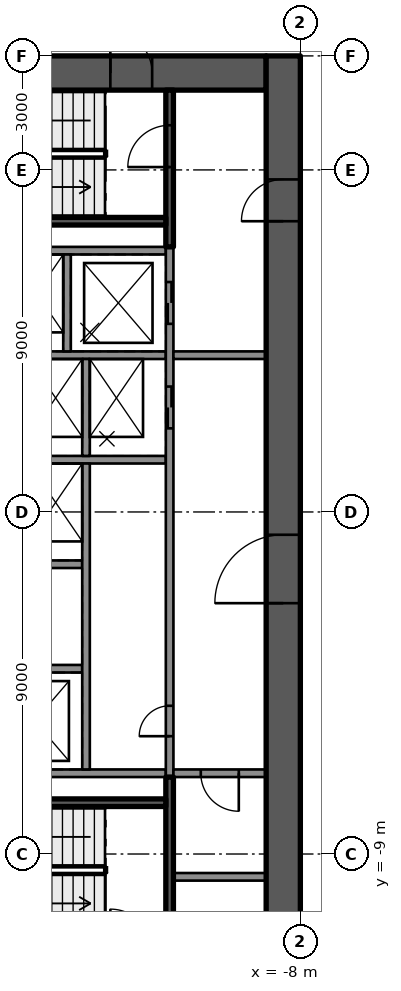
"""IFC4 building model, lengths in metres.
Left out: names, types, materials, properties, quantities, classifications, styles, units other than length and angle.
Written with IfcOpenShell. Run it as: python <this file> out.ifc"""

import sys

from ifc_helpers import new_model, si_unit, direction, frame, frame_2d, origin, place, context, subcontext, project, spatial, rectangle, extrude, element, fill, save


model = new_model("IFC4")
c1 = context("Model", 3, precision=1e-05, world=origin(), true_north=direction((0.0, 1.0)))
c2 = subcontext(c1, "Body", "Model", "MODEL_VIEW")
j1 = project(units=[si_unit("LENGTHUNIT", "METRE"), si_unit("PLANEANGLEUNIT", "RADIAN")], contexts=[c1])
p1 = place(None, origin())
s1 = spatial("IfcSite", under=j1, at=p1, CompositionType="ELEMENT")
p2 = place(p1, origin())
s2 = spatial("IfcBuilding", under=s1, at=p2, CompositionType="ELEMENT")
p3 = place(p2, frame((0.0, 0.0, 152.6)))
s3 = spatial("IfcBuildingStorey", under=s2, at=p3, CompositionType="ELEMENT", Elevation=152.6)
p4 = place(p3, frame((-18.1, 11.55, 0.0), z_axis=(0.0, 0.0, 1.0), x_axis=(1.0, 0.0, 0.0)))
e1 = element("IfcWall", 1, at=p4, inside=s3, PredefinedType="SHEAR", context=c2, shape_type="SweptSolid", body=[
    extrude(rectangle(XDim=9.2, YDim=0.9, at=frame_2d((4.6, 0.0))), origin(), (0.0, 0.0, 1.0), 3.5),
])
p5 = place(p4, frame((5.1, 0.0, 0.0)))
e2 = element("IfcOpeningElement", 2, at=p5, cuts=e1, PredefinedType="OPENING", context=c2, shape_type="SweptSolid", body=[
    extrude(rectangle(XDim=1.1, YDim=2.1, at=frame_2d((0.55, 1.05))), frame((0.0, 0.46, 0.0), z_axis=(0.0, -1.0, 0.0), x_axis=(1.0, 0.0, 0.0)), (0.0, 0.0, 1.0), 0.92),
])
p6 = place(p3, frame((-8.45, -12.0, 0.0), z_axis=(0.0, 0.0, 1.0), x_axis=(0.0, 1.0, 0.0)))
e3 = element("IfcWall", 3, at=p6, inside=s3, PredefinedType="SHEAR", context=c2, shape_type="SweptSolid", body=[
    extrude(rectangle(XDim=24.0, YDim=0.9, at=frame_2d((12.0, 0.0))), origin(), (0.0, 0.0, 1.0), 3.5),
])
p7 = place(p6, frame((9.6, 0.0, 0.0)))
e4 = element("IfcOpeningElement", 4, at=p7, cuts=e3, PredefinedType="OPENING", context=c2, shape_type="SweptSolid", body=[
    extrude(rectangle(XDim=1.8, YDim=2.1, at=frame_2d((0.9, 1.05))), frame((0.0, 0.46, 0.0), z_axis=(0.0, -1.0, 0.0), x_axis=(1.0, 0.0, 0.0)), (0.0, 0.0, 1.0), 0.92),
])
p8 = place(p6, frame((19.65, 0.0, 0.0)))
e5 = element("IfcOpeningElement", 5, at=p8, cuts=e3, PredefinedType="OPENING", context=c2, shape_type="SweptSolid", body=[
    extrude(rectangle(XDim=1.1, YDim=2.1, at=frame_2d((0.55, 1.05))), frame((0.0, 0.46, 0.0), z_axis=(0.0, -1.0, 0.0), x_axis=(1.0, 0.0, 0.0)), (0.0, 0.0, 1.0), 0.92),
])
for number, where, z_axis, x_axis in (
    (6, (-11.54, 6.875, 0.0), (0.0, 0.0, 1.0), (-1.0, 0.0, 0.0)),
    (7, (-11.54, -6.875, 0.0), (0.0, 0.0, 1.0), (-1.0, 0.0, 0.0)),
):
    element("IfcWall", number, at=place(p3, frame(where, z_axis=z_axis, x_axis=x_axis)), inside=s3, PredefinedType="SOLIDWALL", context=c2, shape_type="SweptSolid", body=[
        extrude(rectangle(XDim=6.56, YDim=0.2, at=frame_2d((3.28, 0.0))), origin(), (0.0, 0.0, 1.0), 3.09),
    ])
p9 = place(p3, frame((-13.74, -4.125, 0.0), z_axis=(0.0, 0.0, 1.0), x_axis=(-1.0, 0.0, 0.0)))
e8 = element("IfcWall", 8, at=p9, inside=s3, PredefinedType="SOLIDWALL", context=c2, shape_type="SweptSolid", body=[
    extrude(rectangle(XDim=2.5, YDim=0.2, at=frame_2d((1.25, 0.0))), origin(), (0.0, 0.0, 1.0), 3.09),
])
p10 = place(p3, frame((-13.74, -1.375, 0.0), z_axis=(0.0, 0.0, 1.0), x_axis=(-1.0, 0.0, 0.0)))
e9 = element("IfcWall", 9, at=p10, inside=s3, PredefinedType="SOLIDWALL", context=c2, shape_type="SweptSolid", body=[
    extrude(rectangle(XDim=2.0, YDim=0.2, at=frame_2d((1.0, 0.0))), origin(), (0.0, 0.0, 1.0), 3.09),
])
p11 = place(p3, frame((-11.54, 1.375, 0.0), z_axis=(0.0, 0.0, 1.0), x_axis=(-1.0, 0.0, 0.0)))
e10 = element("IfcWall", 10, at=p11, inside=s3, PredefinedType="SOLIDWALL", context=c2, shape_type="SweptSolid", body=[
    extrude(rectangle(XDim=4.2, YDim=0.2, at=frame_2d((2.1, 0.0))), origin(), (0.0, 0.0, 1.0), 3.09),
])
p12 = place(p3, frame((-11.54, 4.125, 0.0), z_axis=(0.0, 0.0, 1.0), x_axis=(-1.0, 0.0, 0.0)))
e11 = element("IfcWall", 11, at=p12, inside=s3, PredefinedType="SOLIDWALL", context=c2, shape_type="SweptSolid", body=[
    extrude(rectangle(XDim=4.7, YDim=0.2, at=frame_2d((2.35, 0.0))), origin(), (0.0, 0.0, 1.0), 3.09),
])
p13 = place(p3, frame((-11.44, -6.975, 0.0), z_axis=(0.0, 0.0, 1.0), x_axis=(0.0, 1.0, 0.0)))
e12 = element("IfcWall", 12, at=p13, inside=s3, PredefinedType="SOLIDWALL", context=c2, shape_type="SweptSolid", body=[
    extrude(rectangle(XDim=13.95, YDim=0.2, at=frame_2d((6.975, 0.0))), origin(), (0.0, 0.0, 1.0), 3.09),
])
p14 = place(p13, frame((9.175, 0.0, 0.0)))
e13 = element("IfcOpeningElement", 13, at=p14, cuts=e12, PredefinedType="OPENING", context=c2, shape_type="SweptSolid", body=[
    extrude(rectangle(XDim=1.1, YDim=2.1, at=frame_2d((0.55, 1.05))), frame((0.0, 0.11, 0.0), z_axis=(0.0, -1.0, 0.0), x_axis=(1.0, 0.0, 0.0)), (0.0, 0.0, 1.0), 0.22),
])
p15 = place(p13, frame((11.925, 0.0, 0.0)))
e14 = element("IfcOpeningElement", 14, at=p15, cuts=e12, PredefinedType="OPENING", context=c2, shape_type="SweptSolid", body=[
    extrude(rectangle(XDim=1.1, YDim=2.1, at=frame_2d((0.55, 1.05))), frame((0.0, 0.11, 0.0), z_axis=(0.0, -1.0, 0.0), x_axis=(1.0, 0.0, 0.0)), (0.0, 0.0, 1.0), 0.22),
])
p16 = place(p13, frame((1.075, 0.0, 0.0)))
e15 = element("IfcOpeningElement", 15, at=p16, cuts=e12, PredefinedType="OPENING", context=c2, shape_type="SweptSolid", body=[
    extrude(rectangle(XDim=0.8, YDim=2.1, at=frame_2d((0.4, 1.05))), frame((0.0, 0.11, 0.0), z_axis=(0.0, -1.0, 0.0), x_axis=(1.0, 0.0, 0.0)), (0.0, 0.0, 1.0), 0.22),
])
p17 = place(p3, frame((-13.64, -6.775, 0.0), z_axis=(0.0, 0.0, 1.0), x_axis=(0.0, 1.0, 0.0)))
e16 = element("IfcWall", 16, at=p17, inside=s3, PredefinedType="SOLIDWALL", context=c2, shape_type="SweptSolid", body=[
    extrude(rectangle(XDim=8.05, YDim=0.2, at=frame_2d((4.025, 0.0))), origin(), (0.0, 0.0, 1.0), 3.09),
])
for number, where, z_axis, x_axis in (
    (17, (-13.64, 1.475, 0.0), (0.0, 0.0, 1.0), (0.0, 1.0, 0.0)),
    (18, (-14.14, 4.225, 0.0), (0.0, 0.0, 1.0), (0.0, 1.0, 0.0)),
):
    element("IfcWall", number, at=place(p3, frame(where, z_axis=z_axis, x_axis=x_axis)), inside=s3, PredefinedType="SOLIDWALL", context=c2, shape_type="SweptSolid", body=[
        extrude(rectangle(XDim=2.55, YDim=0.2, at=frame_2d((1.275, 0.0))), origin(), (0.0, 0.0, 1.0), 3.09),
    ])
p18 = place(p3, frame((-11.44, 6.975, 0.0), z_axis=(0.0, 0.0, 1.0), x_axis=(0.0, 1.0, 0.0)))
e19 = element("IfcWall", 19, at=p18, inside=s3, PredefinedType="SOLIDWALL", context=c2, shape_type="SweptSolid", body=[
    extrude(rectangle(XDim=4.125, YDim=0.2, at=frame_2d((2.062, 0.0))), origin(), (0.0, 0.0, 1.0), 3.09),
])
p19 = place(p18, frame((2.1, 0.0, 0.0)))
e20 = element("IfcOpeningElement", 20, at=p19, cuts=e19, PredefinedType="OPENING", context=c2, shape_type="SweptSolid", body=[
    extrude(rectangle(XDim=1.1, YDim=2.1, at=frame_2d((0.55, 1.05))), frame((0.0, 0.11, 0.0), z_axis=(0.0, -1.0, 0.0), x_axis=(1.0, 0.0, 0.0)), (0.0, 0.0, 1.0), 0.22),
])
p20 = place(p3, frame((-11.54, 7.65, 0.0), z_axis=(0.0, 0.0, 1.0), x_axis=(-1.0, 0.0, 0.0)))
e21 = element("IfcWall", 21, at=p20, inside=s3, PredefinedType="SOLIDWALL", context=c2, shape_type="SweptSolid", body=[
    extrude(rectangle(XDim=6.56, YDim=0.2, at=frame_2d((3.28, 0.0))), origin(), (0.0, 0.0, 1.0), 3.09),
])
p21 = place(p3, frame((-11.44, -11.1, 0.0), z_axis=(0.0, 0.0, 1.0), x_axis=(0.0, 1.0, 0.0)))
e22 = element("IfcWall", 22, at=p21, inside=s3, PredefinedType="SOLIDWALL", context=c2, shape_type="SweptSolid", body=[
    extrude(rectangle(XDim=4.125, YDim=0.2, at=frame_2d((2.062, 0.0))), origin(), (0.0, 0.0, 1.0), 3.09),
])
p22 = place(p3, frame((-11.54, -7.65, 0.0), z_axis=(0.0, 0.0, 1.0), x_axis=(-1.0, 0.0, 0.0)))
e23 = element("IfcWall", 23, at=p22, inside=s3, PredefinedType="SOLIDWALL", context=c2, shape_type="SweptSolid", body=[
    extrude(rectangle(XDim=6.56, YDim=0.2, at=frame_2d((3.28, 0.0))), origin(), (0.0, 0.0, 1.0), 3.09),
])
p23 = place(p3, frame((-8.9, 4.125, 0.0), z_axis=(0.0, 0.0, 1.0), x_axis=(-1.0, 0.0, 0.0)))
e24 = element("IfcWall", 24, at=p23, inside=s3, PredefinedType="PARTITIONING", context=c2, shape_type="SweptSolid", body=[
    extrude(rectangle(XDim=2.44, YDim=0.2, at=frame_2d((1.22, 0.0))), origin(), (0.0, 0.0, 1.0), 3.09),
])
p24 = place(p3, frame((-8.9, -6.875, 0.0), z_axis=(0.0, 0.0, 1.0), x_axis=(-1.0, 0.0, 0.0)))
e25 = element("IfcWall", 25, at=p24, inside=s3, PredefinedType="PARTITIONING", context=c2, shape_type="SweptSolid", body=[
    extrude(rectangle(XDim=2.44, YDim=0.2, at=frame_2d((1.22, 0.0))), origin(), (0.0, 0.0, 1.0), 3.09),
])
p25 = place(p24, frame((0.72, 0.0, 0.0)))
e26 = element("IfcOpeningElement", 26, at=p25, cuts=e25, PredefinedType="OPENING", context=c2, shape_type="SweptSolid", body=[
    extrude(rectangle(XDim=1.0, YDim=2.1, at=frame_2d((0.5, 1.05))), frame((0.0, 0.11, 0.0), z_axis=(0.0, -1.0, 0.0), x_axis=(1.0, 0.0, 0.0)), (0.0, 0.0, 1.0), 0.22),
])
p26 = place(p3, frame((-8.9, -9.6, 0.0), z_axis=(0.0, 0.0, 1.0), x_axis=(-1.0, 0.0, 0.0)))
e27 = element("IfcWall", 27, at=p26, inside=s3, PredefinedType="PARTITIONING", context=c2, shape_type="SweptSolid", body=[
    extrude(rectangle(XDim=2.44, YDim=0.2, at=frame_2d((1.22, 0.0))), origin(), (0.0, 0.0, 1.0), 3.09),
])
p27 = place(p14, origin())
e28 = element("IfcDoor", 28, at=p27, inside=s3, OperationType="DOUBLE_DOOR_SLIDING", PredefinedType="DOOR", context=c2, shape_type="SweptSolid", body=[
    extrude(rectangle(XDim=1.1, YDim=2.1, at=frame_2d((0.55, 1.05))), frame((0.0, 0.025, 0.0), z_axis=(0.0, -1.0, 0.0), x_axis=(1.0, 0.0, 0.0)), (0.0, 0.0, 1.0), 0.05),
])
fill(e13, e28)
p28 = place(p15, origin())
e29 = element("IfcDoor", 29, at=p28, inside=s3, OperationType="DOUBLE_DOOR_SLIDING", PredefinedType="DOOR", context=c2, shape_type="SweptSolid", body=[
    extrude(rectangle(XDim=1.1, YDim=2.1, at=frame_2d((0.55, 1.05))), frame((0.0, 0.025, 0.0), z_axis=(0.0, -1.0, 0.0), x_axis=(1.0, 0.0, 0.0)), (0.0, 0.0, 1.0), 0.05),
])
fill(e14, e29)
p29 = place(p16, origin())
e30 = element("IfcDoor", 30, at=p29, inside=s3, OperationType="SINGLE_SWING_LEFT", PredefinedType="DOOR", context=c2, shape_type="SweptSolid", body=[
    extrude(rectangle(XDim=0.8, YDim=2.1, at=frame_2d((0.4, 1.05))), frame((0.0, 0.025, 0.0), z_axis=(0.0, -1.0, 0.0), x_axis=(1.0, 0.0, 0.0)), (0.0, 0.0, 1.0), 0.05),
])
fill(e15, e30)
p30 = place(p7, origin())
e31 = element("IfcDoor", 31, at=p30, inside=s3, OperationType="SINGLE_SWING_LEFT", PredefinedType="DOOR", context=c2, shape_type="SweptSolid", body=[
    extrude(rectangle(XDim=1.8, YDim=2.1, at=frame_2d((0.9, 1.05))), frame((0.0, 0.025, 0.0), z_axis=(0.0, -1.0, 0.0), x_axis=(1.0, 0.0, 0.0)), (0.0, 0.0, 1.0), 0.05),
])
fill(e4, e31)
p31 = place(p8, origin())
e32 = element("IfcDoor", 32, at=p31, inside=s3, OperationType="SINGLE_SWING_RIGHT", PredefinedType="DOOR", context=c2, shape_type="SweptSolid", body=[
    extrude(rectangle(XDim=1.1, YDim=2.1, at=frame_2d((0.55, 1.05))), frame((0.0, 0.025, 0.0), z_axis=(0.0, -1.0, 0.0), x_axis=(1.0, 0.0, 0.0)), (0.0, 0.0, 1.0), 0.05),
])
fill(e5, e32)
p32 = place(p5, origin())
e33 = element("IfcDoor", 33, at=p32, inside=s3, OperationType="SINGLE_SWING_RIGHT", PredefinedType="DOOR", context=c2, shape_type="SweptSolid", body=[
    extrude(rectangle(XDim=1.1, YDim=2.1, at=frame_2d((0.55, 1.05))), frame((0.0, 0.025, 0.0), z_axis=(0.0, -1.0, 0.0), x_axis=(1.0, 0.0, 0.0)), (0.0, 0.0, 1.0), 0.05),
])
fill(e2, e33)
p33 = place(p19, origin())
e34 = element("IfcDoor", 34, at=p33, inside=s3, OperationType="SINGLE_SWING_RIGHT", PredefinedType="DOOR", context=c2, shape_type="SweptSolid", body=[
    extrude(rectangle(XDim=1.1, YDim=2.1, at=frame_2d((0.55, 1.05))), frame((0.0, 0.025, 0.0), z_axis=(0.0, -1.0, 0.0), x_axis=(1.0, 0.0, 0.0)), (0.0, 0.0, 1.0), 0.05),
])
fill(e20, e34)
p34 = place(p25, origin())
e35 = element("IfcDoor", 35, at=p34, inside=s3, OperationType="SINGLE_SWING_RIGHT", PredefinedType="DOOR", context=c2, shape_type="SweptSolid", body=[
    extrude(rectangle(XDim=1.0, YDim=2.1, at=frame_2d((0.5, 1.05))), frame((0.0, 0.025, 0.0), z_axis=(0.0, -1.0, 0.0), x_axis=(1.0, 0.0, 0.0)), (0.0, 0.0, 1.0), 0.05),
])
fill(e26, e35)
save(model, sys.argv[1])
